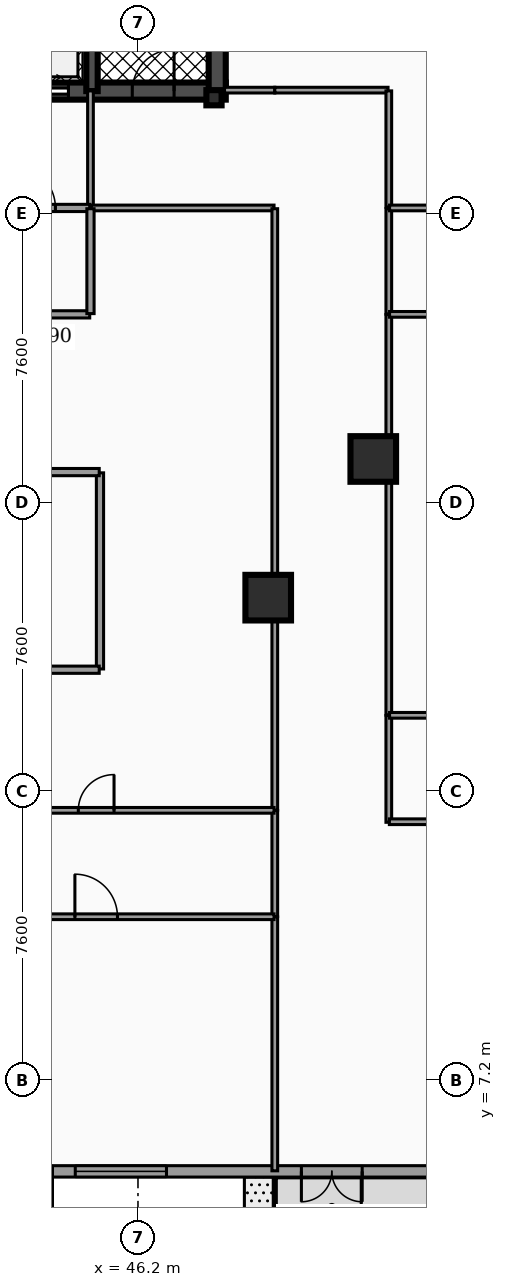
"""IFC4 building model, lengths in metres.
Left out: names, types, materials, properties, quantities, classifications, styles, units other than length and angle.
Written with IfcOpenShell. Run it as: python <this file> out.ifc"""

import sys

from ifc_helpers import new_model, si_unit, direction, frame, frame_2d, origin, origin_2d, place, context, subcontext, project, spatial, rectangle, hollow_rectangle, extrude, element, fill, save


model = new_model("IFC4")
c1 = context("Model", 3, precision=1e-05, world=origin(), true_north=direction((0.0, 1.0)))
c2 = subcontext(c1, "Body", "Model", "MODEL_VIEW")
j1 = project(units=[si_unit("LENGTHUNIT", "METRE"), si_unit("PLANEANGLEUNIT", "RADIAN")], contexts=[c1])
p1 = place(None, origin())
s1 = spatial("IfcSite", under=j1, at=p1, CompositionType="ELEMENT")
p2 = place(p1, origin())
s2 = spatial("IfcBuilding", under=s1, at=p2, CompositionType="ELEMENT")
p3 = place(p2, origin())
s3 = spatial("IfcBuildingStorey", under=s2, at=p3, CompositionType="ELEMENT", Elevation=0.0)
p4 = place(p3, frame((28.4, 33.225, 0.0), z_axis=(0.0, 0.0, 1.0), x_axis=(1.0, 0.0, 0.0)))
e1 = element("IfcWall", 1, at=p4, inside=s3, PredefinedType="SHEAR", context=c2, shape_type="SweptSolid", body=[
    extrude(rectangle(XDim=20.11, YDim=0.45, at=frame_2d((10.055, 0.0))), origin(), (0.0, 0.0, 1.0), 4.82),
])
p5 = place(p4, frame((4.03, 0.0, 0.0)))
e2 = element("IfcOpeningElement", 2, at=p5, cuts=e1, PredefinedType="OPENING", context=c2, shape_type="SweptSolid", body=[
    extrude(rectangle(XDim=1.1, YDim=2.15, at=frame_2d((0.55, 1.075))), frame((0.0, 0.235, 0.0), z_axis=(0.0, -1.0, 0.0), x_axis=(1.0, 0.0, 0.0)), (0.0, 0.0, 1.0), 0.47),
])
p6 = place(p4, frame((14.87, 0.0, 0.0)))
e3 = element("IfcOpeningElement", 3, at=p6, cuts=e1, PredefinedType="OPENING", context=c2, shape_type="SweptSolid", body=[
    extrude(rectangle(XDim=1.1, YDim=2.15, at=frame_2d((0.55, 1.075))), frame((0.0, 0.235, 0.0), z_axis=(0.0, -1.0, 0.0), x_axis=(1.0, 0.0, 0.0)), (0.0, 0.0, 1.0), 0.47),
])
p7 = place(p4, frame((5.95, 0.0, 0.0)))
e4 = element("IfcOpeningElement", 4, at=p7, cuts=e1, PredefinedType="OPENING", context=c2, shape_type="SweptSolid", body=[
    extrude(rectangle(XDim=1.0, YDim=2.1, at=frame_2d((0.5, 1.05))), frame((0.0, 0.235, 0.0), z_axis=(0.0, -1.0, 0.0), x_axis=(1.0, 0.0, 0.0)), (0.0, 0.0, 1.0), 0.47),
])
p8 = place(p4, frame((7.65, 0.0, 0.0)))
e5 = element("IfcOpeningElement", 5, at=p8, cuts=e1, PredefinedType="OPENING", context=c2, shape_type="SweptSolid", body=[
    extrude(rectangle(XDim=1.0, YDim=2.1, at=frame_2d((0.5, 1.05))), frame((0.0, 0.235, 0.0), z_axis=(0.0, -1.0, 0.0), x_axis=(1.0, 0.0, 0.0)), (0.0, 0.0, 1.0), 0.47),
])
p9 = place(p4, frame((11.35, 0.0, 0.0)))
e6 = element("IfcOpeningElement", 6, at=p9, cuts=e1, PredefinedType="OPENING", context=c2, shape_type="SweptSolid", body=[
    extrude(rectangle(XDim=1.0, YDim=2.1, at=frame_2d((0.5, 1.05))), frame((0.0, 0.235, 0.0), z_axis=(0.0, -1.0, 0.0), x_axis=(1.0, 0.0, 0.0)), (0.0, 0.0, 1.0), 0.47),
])
p10 = place(p4, frame((13.05, 0.0, 0.0)))
e7 = element("IfcOpeningElement", 7, at=p10, cuts=e1, PredefinedType="OPENING", context=c2, shape_type="SweptSolid", body=[
    extrude(rectangle(XDim=1.0, YDim=2.1, at=frame_2d((0.5, 1.05))), frame((0.0, 0.235, 0.0), z_axis=(0.0, -1.0, 0.0), x_axis=(1.0, 0.0, 0.0)), (0.0, 0.0, 1.0), 0.47),
])
p11 = place(p4, frame((1.31, 0.0, 0.0)))
e8 = element("IfcOpeningElement", 8, at=p11, cuts=e1, PredefinedType="OPENING", context=c2, shape_type="SweptSolid", body=[
    extrude(rectangle(XDim=1.1, YDim=2.2, at=frame_2d((0.55, 1.1))), frame((0.0, 0.235, 0.0), z_axis=(0.0, -1.0, 0.0), x_axis=(1.0, 0.0, 0.0)), (0.0, 0.0, 1.0), 0.47),
])
p12 = place(p4, frame((9.44, 0.0, 0.0)))
e9 = element("IfcOpeningElement", 9, at=p12, cuts=e1, PredefinedType="OPENING", context=c2, shape_type="SweptSolid", body=[
    extrude(rectangle(XDim=1.12, YDim=2.05, at=frame_2d((0.56, 1.025))), frame((0.0, 0.235, 0.0), z_axis=(0.0, -1.0, 0.0), x_axis=(1.0, 0.0, 0.0)), (0.0, 0.0, 1.0), 0.47),
])
p13 = place(p4, frame((17.65, 0.0, 0.0)))
e10 = element("IfcOpeningElement", 10, at=p13, cuts=e1, PredefinedType="OPENING", context=c2, shape_type="SweptSolid", body=[
    extrude(rectangle(XDim=1.1, YDim=2.2, at=frame_2d((0.55, 1.1))), frame((0.0, 0.235, 0.0), z_axis=(0.0, -1.0, 0.0), x_axis=(1.0, 0.0, 0.0)), (0.0, 0.0, 1.0), 0.47),
])
p14 = place(p3, frame((44.99, 33.225, 0.0), z_axis=(0.0, 0.0, 1.0), x_axis=(0.0, 1.0, 0.0)))
e11 = element("IfcWall", 11, at=p14, inside=s3, PredefinedType="SHEAR", context=c2, shape_type="SweptSolid", body=[
    extrude(rectangle(XDim=10.25, YDim=0.3, at=frame_2d((5.125, 0.0))), origin(), (0.0, 0.0, 1.0), 4.82),
])
p15 = place(p3, frame((48.285, 33.225, 0.0), z_axis=(0.0, 0.0, 1.0), x_axis=(0.0, 1.0, 0.0)))
e12 = element("IfcWall", 12, at=p15, inside=s3, PredefinedType="SHEAR", context=c2, shape_type="SweptSolid", body=[
    extrude(rectangle(XDim=10.25, YDim=0.45, at=frame_2d((5.125, 0.0))), origin(), (0.0, 0.0, 1.0), 4.82),
])
for number, where, z_axis, x_axis in (
    (13, (49.627, 19.896, 0.0), (0.0, 0.0, 1.0), (1.0, 0.0, 0.0)),
    (14, (52.391, 23.545, 0.0), (0.0, 0.0, 1.0), (1.0, 0.0, 0.0)),
):
    element("IfcColumn", number, at=place(p3, frame(where, z_axis=z_axis, x_axis=x_axis)), inside=s3, PredefinedType="COLUMN", context=c2, shape_type="SweptSolid", body=[
        extrude(hollow_rectangle(XDim=1.2, YDim=1.2, WallThickness=0.06, at=origin_2d()), origin(), (0.0, 0.0, 1.0), 4.82),
    ])
p16 = place(p3, frame((48.2, 33.05, 0.0), z_axis=(0.0, 0.0, 1.0), x_axis=(1.0, 0.0, 0.0)))
e15 = element("IfcColumn", 15, at=p16, inside=s3, PredefinedType="PILASTER", context=c2, shape_type="SweptSolid", body=[
    extrude(hollow_rectangle(XDim=0.4, YDim=0.4, WallThickness=0.02, at=origin_2d()), origin(), (0.0, 0.0, 1.0), 4.82),
])
p17 = place(p3, frame((75.1, 4.8, 0.0), z_axis=(0.0, 0.0, 1.0), x_axis=(-1.0, 0.0, 0.0)))
e16 = element("IfcWall", 16, at=p17, inside=s3, PredefinedType="STANDARD", context=c2, shape_type="SweptSolid", body=[
    extrude(rectangle(XDim=73.4, YDim=0.3, at=frame_2d((36.7, 0.0))), origin(), (0.0, 0.0, 1.0), 4.205),
])
p18 = place(p17, frame((65.3, 0.0, 0.0)))
e17 = element("IfcOpeningElement", 17, at=p18, cuts=e16, PredefinedType="OPENING", context=c2, shape_type="SweptSolid", body=[
    extrude(rectangle(XDim=4.4, YDim=3.5, at=frame_2d((2.2, 1.75))), frame((0.0, 0.16, 0.0), z_axis=(0.0, -1.0, 0.0), x_axis=(1.0, 0.0, 0.0)), (0.0, 0.0, 1.0), 0.32),
])
p19 = place(p17, frame((31.15, 0.0, 0.0)))
e18 = element("IfcOpeningElement", 18, at=p19, cuts=e16, PredefinedType="OPENING", context=c2, shape_type="SweptSolid", body=[
    extrude(rectangle(XDim=2.4, YDim=2.6, at=frame_2d((1.2, 1.3))), frame((0.0, 0.16, 0.0), z_axis=(0.0, -1.0, 0.0), x_axis=(1.0, 0.0, 0.0)), (0.0, 0.0, 1.0), 0.32),
])
p20 = place(p17, frame((50.6, 0.0, 0.0)))
e19 = element("IfcOpeningElement", 19, at=p20, cuts=e16, PredefinedType="OPENING", context=c2, shape_type="SweptSolid", body=[
    extrude(rectangle(XDim=1.6, YDim=2.4, at=frame_2d((0.8, 1.2))), frame((0.0, 0.16, 0.0), z_axis=(0.0, -1.0, 0.0), x_axis=(1.0, 0.0, 0.0)), (0.0, 0.0, 1.0), 0.32),
])
p21 = place(p17, frame((23.0, 0.0, 0.0)))
e20 = element("IfcOpeningElement", 20, at=p21, cuts=e16, PredefinedType="OPENING", context=c2, shape_type="SweptSolid", body=[
    extrude(rectangle(XDim=1.6, YDim=2.4, at=frame_2d((0.8, 1.2))), frame((0.0, 0.16, 0.0), z_axis=(0.0, -1.0, 0.0), x_axis=(1.0, 0.0, 0.0)), (0.0, 0.0, 1.0), 0.32),
])
p22 = place(p17, frame((7.6, 0.0, 0.0)))
e21 = element("IfcOpeningElement", 21, at=p22, cuts=e16, PredefinedType="OPENING", context=c2, shape_type="SweptSolid", body=[
    extrude(rectangle(XDim=1.8, YDim=2.4, at=frame_2d((0.9, 1.2))), frame((0.0, 0.16, 0.0), z_axis=(0.0, -1.0, 0.0), x_axis=(1.0, 0.0, 0.0)), (0.0, 0.0, 1.0), 0.32),
])
p23 = place(p17, frame((17.1, 0.0, 0.0)))
e22 = element("IfcOpeningElement", 22, at=p23, cuts=e16, PredefinedType="OPENING", context=c2, shape_type="SweptSolid", body=[
    extrude(rectangle(XDim=1.8, YDim=2.4, at=frame_2d((0.9, 1.2))), frame((0.0, 0.16, 0.0), z_axis=(0.0, -1.0, 0.0), x_axis=(1.0, 0.0, 0.0)), (0.0, 0.0, 1.0), 0.32),
])
p24 = place(p17, frame((59.75, 0.0, 0.0)))
e23 = element("IfcOpeningElement", 23, at=p24, cuts=e16, PredefinedType="OPENING", context=c2, shape_type="SweptSolid", body=[
    extrude(rectangle(XDim=1.8, YDim=2.4, at=frame_2d((0.9, 1.2))), frame((0.0, 0.16, 0.0), z_axis=(0.0, -1.0, 0.0), x_axis=(1.0, 0.0, 0.0)), (0.0, 0.0, 1.0), 0.32),
])
p25 = place(p17, frame((13.6, 0.0, 0.9)))
e24 = element("IfcOpeningElement", 24, at=p25, cuts=e16, PredefinedType="OPENING", context=c2, shape_type="SweptSolid", body=[
    extrude(rectangle(XDim=2.4, YDim=2.5, at=frame_2d((1.2, 1.25))), frame((0.0, 0.16, 0.0), z_axis=(0.0, -1.0, 0.0), x_axis=(1.0, 0.0, 0.0)), (0.0, 0.0, 1.0), 0.32),
])
p26 = place(p17, frame((28.15, 0.0, 0.9)))
e25 = element("IfcOpeningElement", 25, at=p26, cuts=e16, PredefinedType="OPENING", context=c2, shape_type="SweptSolid", body=[
    extrude(rectangle(XDim=2.4, YDim=2.5, at=frame_2d((1.2, 1.25))), frame((0.0, 0.16, 0.0), z_axis=(0.0, -1.0, 0.0), x_axis=(1.0, 0.0, 0.0)), (0.0, 0.0, 1.0), 0.32),
])
p27 = place(p17, frame((44.1, 0.0, 0.9)))
e26 = element("IfcOpeningElement", 26, at=p27, cuts=e16, PredefinedType="OPENING", context=c2, shape_type="SweptSolid", body=[
    extrude(rectangle(XDim=2.4, YDim=2.5, at=frame_2d((1.2, 1.25))), frame((0.0, 0.16, 0.0), z_axis=(0.0, -1.0, 0.0), x_axis=(1.0, 0.0, 0.0)), (0.0, 0.0, 1.0), 0.32),
])
p28 = place(p3, frame((44.95, 30.17, 0.0), z_axis=(0.0, 0.0, 1.0), x_axis=(0.0, 1.0, 0.0)))
e27 = element("IfcWall", 27, at=p28, inside=s3, PredefinedType="PARTITIONING", context=c2, shape_type="SweptSolid", body=[
    extrude(rectangle(XDim=3.06, YDim=0.15, at=frame_2d((1.53, 0.0))), origin(), (0.0, 0.0, 1.0), 3.777),
])
p29 = place(p3, frame((42.005, 30.15, 0.0), z_axis=(0.0, 0.0, 1.0), x_axis=(1.0, 0.0, 0.0)))
e28 = element("IfcWall", 28, at=p29, inside=s3, PredefinedType="PARTITIONING", context=c2, shape_type="SweptSolid", body=[
    extrude(rectangle(XDim=2.925, YDim=0.19, at=frame_2d((1.462, 0.0))), origin(), (0.0, 0.0, 1.0), 3.777),
])
p30 = place(p29, frame((0.903, 0.0, 0.0)))
e29 = element("IfcOpeningElement", 29, at=p30, cuts=e28, PredefinedType="OPENING", context=c2, shape_type="SweptSolid", body=[
    extrude(rectangle(XDim=1.12, YDim=2.05, at=frame_2d((0.56, 1.025))), frame((0.0, 0.105, 0.0), z_axis=(0.0, -1.0, 0.0), x_axis=(1.0, 0.0, 0.0)), (0.0, 0.0, 1.0), 0.21),
])
p31 = place(p3, frame((52.8, 27.355, 0.0), z_axis=(0.0, 0.0, 1.0), x_axis=(0.0, 1.0, 0.0)))
e30 = element("IfcWall", 30, at=p31, inside=s3, PredefinedType="PARTITIONING", context=c2, shape_type="SweptSolid", body=[
    extrude(rectangle(XDim=2.775, YDim=0.15, at=frame_2d((1.387, 0.0))), origin(), (0.0, 0.0, 1.0), 3.777),
])
p32 = place(p3, frame((52.8, 13.985, 0.0), z_axis=(0.0, 0.0, 1.0), x_axis=(0.0, 1.0, 0.0)))
e31 = element("IfcWall", 31, at=p32, inside=s3, PredefinedType="PARTITIONING", context=c2, shape_type="SweptSolid", body=[
    extrude(rectangle(XDim=2.81, YDim=0.15, at=frame_2d((1.405, 0.0))), origin(), (0.0, 0.0, 1.0), 3.777),
])
p33 = place(p3, frame((49.8, 11.505, 0.0), z_axis=(0.0, 0.0, 1.0), x_axis=(0.0, 1.0, 0.0)))
e32 = element("IfcWall", 32, at=p33, inside=s3, PredefinedType="PARTITIONING", context=c2, shape_type="SweptSolid", body=[
    extrude(rectangle(XDim=2.79, YDim=0.15, at=frame_2d((1.395, 0.0))), origin(), (0.0, 0.0, 1.0), 3.777),
])
p34 = place(p3, frame((52.8, 16.805, 0.0), z_axis=(0.0, 0.0, 1.0), x_axis=(0.0, 1.0, 0.0)))
e33 = element("IfcWall", 33, at=p34, inside=s3, PredefinedType="PARTITIONING", context=c2, shape_type="SweptSolid", body=[
    extrude(rectangle(XDim=10.54, YDim=0.15, at=frame_2d((5.27, 0.0))), origin(), (0.0, 0.0, 1.0), 3.777),
])
p35 = place(p3, frame((48.478, 33.25, 0.0), z_axis=(0.0, 0.0, 1.0), x_axis=(1.0, 0.0, 0.0)))
e34 = element("IfcWall", 34, at=p35, inside=s3, PredefinedType="PARTITIONING", context=c2, shape_type="SweptSolid", body=[
    extrude(rectangle(XDim=1.322, YDim=0.15, at=frame_2d((0.661, 0.0))), origin(), (0.0, 0.0, 1.0), 3.777),
])
p36 = place(p3, frame((49.8, 33.25, 0.0), z_axis=(0.0, 0.0, 1.0), x_axis=(1.0, 0.0, 0.0)))
e35 = element("IfcWall", 35, at=p36, inside=s3, PredefinedType="PARTITIONING", context=c2, shape_type="SweptSolid", body=[
    extrude(rectangle(XDim=2.98, YDim=0.15, at=frame_2d((1.49, 0.0))), origin(), (0.0, 0.0, 1.0), 3.777),
])
p37 = place(p3, frame((52.8, 30.17, 0.0), z_axis=(0.0, 0.0, 1.0), x_axis=(0.0, 1.0, 0.0)))
e36 = element("IfcWall", 36, at=p37, inside=s3, PredefinedType="PARTITIONING", context=c2, shape_type="SweptSolid", body=[
    extrude(rectangle(XDim=3.06, YDim=0.15, at=frame_2d((1.53, 0.0))), origin(), (0.0, 0.0, 1.0), 3.777),
])
p38 = place(p3, frame((44.97, 30.15, 0.0), z_axis=(0.0, 0.0, 1.0), x_axis=(1.0, 0.0, 0.0)))
e37 = element("IfcWall", 37, at=p38, inside=s3, PredefinedType="PARTITIONING", context=c2, shape_type="SweptSolid", body=[
    extrude(rectangle(XDim=4.81, YDim=0.15, at=frame_2d((2.405, 0.0))), origin(), (0.0, 0.0, 1.0), 3.777),
])
p39 = place(p3, frame((49.8, 14.305, 0.0), z_axis=(0.0, 0.0, 1.0), x_axis=(0.0, 1.0, 0.0)))
e38 = element("IfcWall", 38, at=p39, inside=s3, PredefinedType="PARTITIONING", context=c2, shape_type="SweptSolid", body=[
    extrude(rectangle(XDim=15.825, YDim=0.15, at=frame_2d((7.913, 0.0))), origin(), (0.0, 0.0, 1.0), 3.777),
])
p40 = place(p3, frame((49.8, 4.815, 0.0), z_axis=(0.0, 0.0, 1.0), x_axis=(0.0, 1.0, 0.0)))
e39 = element("IfcWall", 39, at=p40, inside=s3, PredefinedType="PARTITIONING", context=c2, shape_type="SweptSolid", body=[
    extrude(rectangle(XDim=6.68, YDim=0.15, at=frame_2d((3.34, 0.0))), origin(), (0.0, 0.0, 1.0), 3.777),
])
p41 = place(p3, frame((42.02, 27.35, 0.0), z_axis=(0.0, 0.0, 1.0), x_axis=(1.0, 0.0, 0.0)))
e40 = element("IfcWall", 40, at=p41, inside=s3, PredefinedType="PARTITIONING", context=c2, shape_type="SweptSolid", body=[
    extrude(rectangle(XDim=2.91, YDim=0.19, at=frame_2d((1.455, 0.0))), origin(), (0.0, 0.0, 1.0), 3.777),
])
p42 = place(p3, frame((44.95, 27.37, 0.0), z_axis=(0.0, 0.0, 1.0), x_axis=(0.0, 1.0, 0.0)))
e41 = element("IfcWall", 41, at=p42, inside=s3, PredefinedType="PARTITIONING", context=c2, shape_type="SweptSolid", body=[
    extrude(rectangle(XDim=2.76, YDim=0.19, at=frame_2d((1.38, 0.0))), origin(), (0.0, 0.0, 1.0), 3.777),
])
p43 = place(p3, frame((52.815, 14.0, 0.0), z_axis=(0.0, 0.0, 1.0), x_axis=(1.0, 0.0, 0.0)))
e42 = element("IfcWall", 42, at=p43, inside=s3, PredefinedType="PARTITIONING", context=c2, shape_type="SweptSolid", body=[
    extrude(rectangle(XDim=4.385, YDim=0.15, at=frame_2d((2.192, 0.0))), origin(), (0.0, 0.0, 1.0), 3.777),
])
p44 = place(p43, frame((1.722, 0.0, 0.0)))
e43 = element("IfcOpeningElement", 43, at=p44, cuts=e42, PredefinedType="OPENING", context=c2, shape_type="SweptSolid", body=[
    extrude(rectangle(XDim=0.94, YDim=2.05, at=frame_2d((0.47, 1.025))), frame((0.0, 0.085, 0.0), z_axis=(0.0, -1.0, 0.0), x_axis=(1.0, 0.0, 0.0)), (0.0, 0.0, 1.0), 0.17),
])
for number, where, z_axis, x_axis in (
    (44, (52.82, 27.35, 0.0), (0.0, 0.0, 1.0), (1.0, 0.0, 0.0)),
    (45, (52.82, 16.8, 0.0), (0.0, 0.0, 1.0), (1.0, 0.0, 0.0)),
    (46, (52.82, 30.15, 0.0), (0.0, 0.0, 1.0), (1.0, 0.0, 0.0)),
):
    element("IfcWall", number, at=place(p3, frame(where, z_axis=z_axis, x_axis=x_axis)), inside=s3, PredefinedType="PARTITIONING", context=c2, shape_type="SweptSolid", body=[
        extrude(rectangle(XDim=4.36, YDim=0.15, at=frame_2d((2.18, 0.0))), origin(), (0.0, 0.0, 1.0), 3.777),
    ])
p45 = place(p3, frame((40.42, 14.3, 0.0), z_axis=(0.0, 0.0, 1.0), x_axis=(1.0, 0.0, 0.0)))
e47 = element("IfcWall", 47, at=p45, inside=s3, PredefinedType="PARTITIONING", context=c2, shape_type="SweptSolid", body=[
    extrude(rectangle(XDim=9.36, YDim=0.15, at=frame_2d((4.68, 0.0))), origin(), (0.0, 0.0, 1.0), 3.777),
])
p46 = place(p45, frame((4.21, 0.0, 0.0)))
e48 = element("IfcOpeningElement", 48, at=p46, cuts=e47, PredefinedType="OPENING", context=c2, shape_type="SweptSolid", body=[
    extrude(rectangle(XDim=0.94, YDim=2.05, at=frame_2d((0.47, 1.025))), frame((0.0, 0.085, 0.0), z_axis=(0.0, -1.0, 0.0), x_axis=(1.0, 0.0, 0.0)), (0.0, 0.0, 1.0), 0.17),
])
p47 = place(p3, frame((40.42, 11.5, 0.0), z_axis=(0.0, 0.0, 1.0), x_axis=(1.0, 0.0, 0.0)))
e49 = element("IfcWall", 49, at=p47, inside=s3, PredefinedType="PARTITIONING", context=c2, shape_type="SweptSolid", body=[
    extrude(rectangle(XDim=9.36, YDim=0.15, at=frame_2d((4.68, 0.0))), origin(), (0.0, 0.0, 1.0), 3.777),
])
p48 = place(p47, frame((4.12, 0.0, 0.0)))
e50 = element("IfcOpeningElement", 50, at=p48, cuts=e49, PredefinedType="OPENING", context=c2, shape_type="SweptSolid", body=[
    extrude(rectangle(XDim=1.12, YDim=2.05, at=frame_2d((0.56, 1.025))), frame((0.0, 0.085, 0.0), z_axis=(0.0, -1.0, 0.0), x_axis=(1.0, 0.0, 0.0)), (0.0, 0.0, 1.0), 0.17),
])
p49 = place(p3, frame((45.2, 18.02, 0.0), z_axis=(0.0, 0.0, 1.0), x_axis=(0.0, 1.0, 0.0)))
e51 = element("IfcWall", 51, at=p49, inside=s3, PredefinedType="PARTITIONING", context=c2, shape_type="SweptSolid", body=[
    extrude(rectangle(XDim=5.16, YDim=0.19, at=frame_2d((2.58, 0.0))), origin(), (0.0, 0.0, 1.0), 3.777),
])
for number, where, z_axis, x_axis in (
    (52, (40.42, 18.0, 0.0), (0.0, 0.0, 1.0), (1.0, 0.0, 0.0)),
    (53, (40.42, 23.2, 0.0), (0.0, 0.0, 1.0), (1.0, 0.0, 0.0)),
):
    element("IfcWall", number, at=place(p3, frame(where, z_axis=z_axis, x_axis=x_axis)), inside=s3, PredefinedType="PARTITIONING", context=c2, shape_type="SweptSolid", body=[
        extrude(rectangle(XDim=4.76, YDim=0.19, at=frame_2d((2.38, 0.0))), origin(), (0.0, 0.0, 1.0), 3.777),
    ])
p50 = place(p19, origin())
e54 = element("IfcDoor", 54, at=p50, inside=s3, OperationType="DOUBLE_DOOR_SINGLE_SWING", PredefinedType="DOOR", context=c2, shape_type="SweptSolid", body=[
    extrude(rectangle(XDim=2.4, YDim=2.6, at=frame_2d((1.2, 1.3))), frame((0.0, 0.025, 0.0), z_axis=(0.0, -1.0, 0.0), x_axis=(1.0, 0.0, 0.0)), (0.0, 0.0, 1.0), 0.05),
])
fill(e18, e54)
p51 = place(p21, origin())
e55 = element("IfcDoor", 55, at=p51, inside=s3, OperationType="DOUBLE_DOOR_SINGLE_SWING", PredefinedType="DOOR", context=c2, shape_type="SweptSolid", body=[
    extrude(rectangle(XDim=1.6, YDim=2.4, at=frame_2d((0.8, 1.2))), frame((0.0, 0.025, 0.0), z_axis=(0.0, -1.0, 0.0), x_axis=(1.0, 0.0, 0.0)), (0.0, 0.0, 1.0), 0.05),
])
fill(e20, e55)
p52 = place(p26, origin())
e56 = element("IfcWindow", 56, at=p52, inside=s3, PartitioningType="SINGLE_PANEL", PredefinedType="WINDOW", context=c2, shape_type="SweptSolid", body=[
    extrude(rectangle(XDim=2.4, YDim=2.5, at=frame_2d((1.2, 1.25))), frame((0.0, 0.03, 0.0), z_axis=(0.0, -1.0, 0.0), x_axis=(1.0, 0.0, 0.0)), (0.0, 0.0, 1.0), 0.06),
])
fill(e25, e56)
p53 = place(p6, origin())
e57 = element("IfcDoor", 57, at=p53, inside=s3, OperationType="SLIDING_TO_RIGHT", PredefinedType="DOOR", context=c2, shape_type="SweptSolid", body=[
    extrude(rectangle(XDim=1.1, YDim=2.15, at=frame_2d((0.55, 1.075))), frame((0.0, 0.025, 0.0), z_axis=(0.0, -1.0, 0.0), x_axis=(1.0, 0.0, 0.0)), (0.0, 0.0, 1.0), 0.05),
])
fill(e3, e57)
p54 = place(p13, origin())
e58 = element("IfcDoor", 58, at=p54, inside=s3, OperationType="SINGLE_SWING_RIGHT", PredefinedType="DOOR", context=c2, shape_type="SweptSolid", body=[
    extrude(rectangle(XDim=1.1, YDim=2.2, at=frame_2d((0.55, 1.1))), frame((0.0, 0.025, 0.0), z_axis=(0.0, -1.0, 0.0), x_axis=(1.0, 0.0, 0.0)), (0.0, 0.0, 1.0), 0.05),
])
fill(e10, e58)
p55 = place(p30, origin())
e59 = element("IfcDoor", 59, at=p55, inside=s3, OperationType="SINGLE_SWING_LEFT", PredefinedType="DOOR", context=c2, shape_type="SweptSolid", body=[
    extrude(rectangle(XDim=1.12, YDim=2.05, at=frame_2d((0.56, 1.025))), frame((0.0, 0.025, 0.0), z_axis=(0.0, -1.0, 0.0), x_axis=(1.0, 0.0, 0.0)), (0.0, 0.0, 1.0), 0.05),
])
fill(e29, e59)
p56 = place(p46, origin())
e60 = element("IfcDoor", 60, at=p56, inside=s3, OperationType="SINGLE_SWING_RIGHT", PredefinedType="DOOR", context=c2, shape_type="SweptSolid", body=[
    extrude(rectangle(XDim=0.94, YDim=2.05, at=frame_2d((0.47, 1.025))), frame((0.0, 0.025, 0.0), z_axis=(0.0, -1.0, 0.0), x_axis=(1.0, 0.0, 0.0)), (0.0, 0.0, 1.0), 0.05),
])
fill(e48, e60)
p57 = place(p48, origin())
e61 = element("IfcDoor", 61, at=p57, inside=s3, OperationType="SINGLE_SWING_LEFT", PredefinedType="DOOR", context=c2, shape_type="SweptSolid", body=[
    extrude(rectangle(XDim=1.12, YDim=2.05, at=frame_2d((0.56, 1.025))), frame((0.0, 0.025, 0.0), z_axis=(0.0, -1.0, 0.0), x_axis=(1.0, 0.0, 0.0)), (0.0, 0.0, 1.0), 0.05),
])
fill(e50, e61)
save(model, sys.argv[1])
